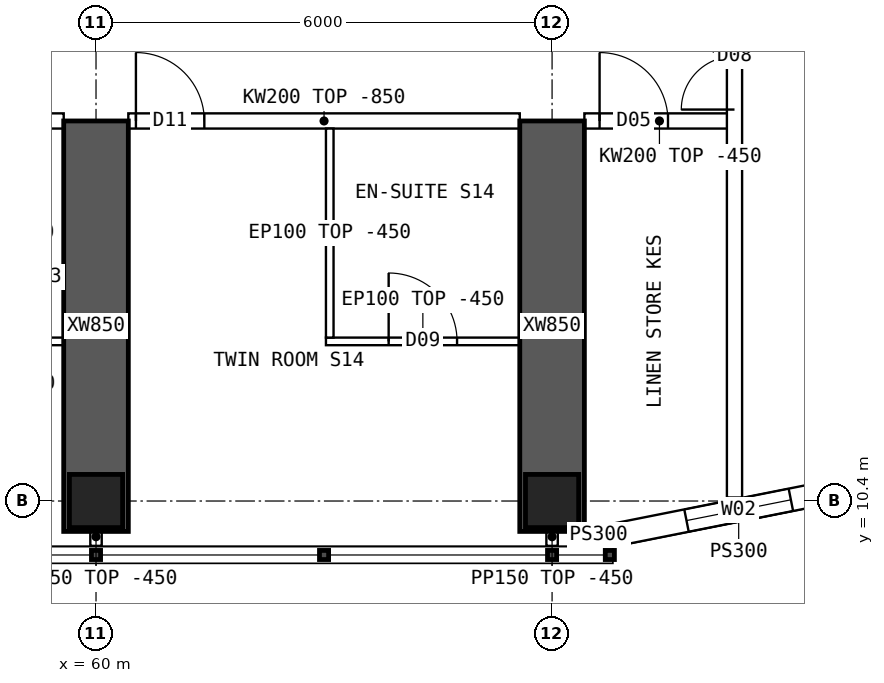
"""IFC4 building model, lengths in metres.
Left out: names, types, materials, properties, quantities, classifications, styles, units other than length and angle.
Written with IfcOpenShell. Run it as: python <this file> out.ifc"""

import sys

from ifc_helpers import new_model, si_unit, direction, frame, frame_2d, origin, origin_2d, place, context, subcontext, project, spatial, polyline, rectangle, hollow_rectangle, outline, extrude, element, fill, save


model = new_model("IFC4")
c1 = context("Model", 3, precision=1e-05, world=origin(), true_north=direction((0.0, 1.0)))
c2 = subcontext(c1, "Body", "Model", "MODEL_VIEW")
j1 = project(units=[si_unit("LENGTHUNIT", "METRE"), si_unit("PLANEANGLEUNIT", "RADIAN")], contexts=[c1])
p1 = place(None, origin())
s1 = spatial("IfcSite", under=j1, at=p1, CompositionType="ELEMENT")
p2 = place(p1, origin())
s2 = spatial("IfcBuilding", under=s1, at=p2, CompositionType="ELEMENT")
p3 = place(p2, frame((0.0, 0.0, 174.85)))
s3 = spatial("IfcBuildingStorey", under=s2, at=p3, CompositionType="ELEMENT", Elevation=174.85)
for number, where, z_axis, x_axis in (
    (1, (60.0, 10.4, 0.0), (0.0, 0.0, 1.0), (1.0, 0.0, 0.0)),
    (2, (66.0, 10.4, 0.0), (0.0, 0.0, 1.0), (1.0, 0.0, 0.0)),
):
    element("IfcColumn", number, at=place(p3, frame(where, z_axis=z_axis, x_axis=x_axis)), inside=s3, PredefinedType="COLUMN", context=c2, shape_type="SweptSolid", body=[
        extrude(hollow_rectangle(XDim=0.7, YDim=0.7, WallThickness=0.07, at=origin_2d()), origin(), (0.0, 0.0, 1.0), 3.75),
    ])
for number, where, z_axis, x_axis in (
    (3, (60.0, 10.0, 0.0), (0.0, 0.0, 1.0), (0.0, 1.0, 0.0)),
    (4, (66.0, 10.0, 0.0), (0.0, 0.0, 1.0), (0.0, 1.0, 0.0)),
):
    element("IfcWall", number, at=place(p3, frame(where, z_axis=z_axis, x_axis=x_axis)), inside=s3, PredefinedType="SHEAR", context=c2, shape_type="SweptSolid", body=[
        extrude(rectangle(XDim=5.4, YDim=0.85, at=frame_2d((2.7, 0.0))), origin(), (0.0, 0.0, 1.0), 3.75),
    ])
p4 = place(p3, frame((66.8, 9.95, 0.0), z_axis=(0.0, 0.0, 1.0), x_axis=(0.98078325777, 0.195100490205, 0.0)))
e5 = element("IfcWall", 5, at=p4, inside=s3, PredefinedType="SOLIDWALL", context=c2, shape_type="SweptSolid", body=[
    extrude(outline(polyline([(-0.03, -0.15), (3.405, -0.15), (3.345, 0.15), (0.03, 0.15), (-0.03, -0.15)])), origin(), (0.0, 0.0, 1.0), 3.3),
])
p5 = place(p4, frame((0.988, 0.0, 0.9)))
e6 = element("IfcOpeningElement", 6, at=p5, cuts=e5, PredefinedType="OPENING", context=c2, shape_type="SweptSolid", body=[
    extrude(rectangle(XDim=1.4, YDim=1.8, at=frame_2d((0.7, 0.9))), frame((0.0, 0.16, 0.0), z_axis=(0.0, -1.0, 0.0), x_axis=(1.0, 0.0, 0.0)), (0.0, 0.0, 1.0), 0.32),
])
p6 = place(p3, frame((66.8, 9.95, 0.0), z_axis=(0.0, 0.0, 1.0), x_axis=(-1.0, 0.0, 0.0)))
e7 = element("IfcWall", 7, at=p6, inside=s3, PredefinedType="SOLIDWALL", context=c2, shape_type="SweptSolid", body=[
    extrude(rectangle(XDim=0.375, YDim=0.3, at=frame_2d((0.188, 0.0))), origin(), (0.0, 0.0, 1.0), 3.3),
])
p7 = place(p3, frame((54.425, 15.4, 0.0), z_axis=(0.0, 0.0, 1.0), x_axis=(1.0, 0.0, 0.0)))
e8 = element("IfcWall", 8, at=p7, inside=s3, PredefinedType="SOLIDWALL", context=c2, shape_type="SweptSolid", body=[
    extrude(outline(polyline([(0.0, 0.0), (5.15, 0.0), (5.15, 2.9), (0.0, 2.9), (0.0, 0.0)])), frame((0.0, 0.1, 0.0), z_axis=(0.0, -1.0, 0.0), x_axis=(1.0, 0.0, 0.0)), (0.0, 0.0, 1.0), 0.2),
])
p8 = place(p7, frame((1.3, 0.0, 0.0)))
e9 = element("IfcOpeningElement", 9, at=p8, cuts=e8, PredefinedType="OPENING", context=c2, shape_type="SweptSolid", body=[
    extrude(rectangle(XDim=0.9, YDim=2.1, at=frame_2d((0.45, 1.05))), frame((0.0, 0.11, 0.0), z_axis=(0.0, -1.0, 0.0), x_axis=(1.0, 0.0, 0.0)), (0.0, 0.0, 1.0), 0.22),
])
p9 = place(p7, frame((2.75, 0.0, 0.0)))
e10 = element("IfcOpeningElement", 10, at=p9, cuts=e8, PredefinedType="OPENING", context=c2, shape_type="SweptSolid", body=[
    extrude(rectangle(XDim=0.9, YDim=2.1, at=frame_2d((0.45, 1.05))), frame((0.0, 0.11, 0.0), z_axis=(0.0, -1.0, 0.0), x_axis=(1.0, 0.0, 0.0)), (0.0, 0.0, 1.0), 0.22),
])
p10 = place(p3, frame((60.425, 15.4, 0.0), z_axis=(0.0, 0.0, 1.0), x_axis=(1.0, 0.0, 0.0)))
e11 = element("IfcWall", 11, at=p10, inside=s3, PredefinedType="SOLIDWALL", context=c2, shape_type="SweptSolid", body=[
    extrude(outline(polyline([(0.0, 0.0), (5.15, 0.0), (5.15, 2.9), (0.0, 2.9), (0.0, 0.0)])), frame((0.0, 0.1, 0.0), z_axis=(0.0, -1.0, 0.0), x_axis=(1.0, 0.0, 0.0)), (0.0, 0.0, 1.0), 0.2),
])
p11 = place(p10, frame((0.1, 0.0, 0.0)))
e12 = element("IfcOpeningElement", 12, at=p11, cuts=e11, PredefinedType="OPENING", context=c2, shape_type="SweptSolid", body=[
    extrude(rectangle(XDim=0.9, YDim=2.1, at=frame_2d((0.45, 1.05))), frame((0.0, 0.11, 0.0), z_axis=(0.0, -1.0, 0.0), x_axis=(1.0, 0.0, 0.0)), (0.0, 0.0, 1.0), 0.22),
])
p12 = place(p3, frame((66.425, 15.4, 0.0), z_axis=(0.0, 0.0, 1.0), x_axis=(1.0, 0.0, 0.0)))
e13 = element("IfcWall", 13, at=p12, inside=s3, PredefinedType="SOLIDWALL", context=c2, shape_type="SweptSolid", body=[
    extrude(rectangle(XDim=1.975, YDim=0.2, at=frame_2d((0.987, 0.0))), origin(), (0.0, 0.0, 1.0), 3.3),
])
p13 = place(p12, frame((0.2, 0.0, 0.0)))
e14 = element("IfcOpeningElement", 14, at=p13, cuts=e13, PredefinedType="OPENING", context=c2, shape_type="SweptSolid", body=[
    extrude(rectangle(XDim=0.9, YDim=2.1, at=frame_2d((0.45, 1.05))), frame((0.0, 0.11, 0.0), z_axis=(0.0, -1.0, 0.0), x_axis=(1.0, 0.0, 0.0)), (0.0, 0.0, 1.0), 0.22),
])
p14 = place(p3, frame((59.575, 12.5, 0.0), z_axis=(0.0, 0.0, 1.0), x_axis=(-1.0, 0.0, 0.0)))
e15 = element("IfcWall", 15, at=p14, inside=s3, PredefinedType="PARTITIONING", context=c2, shape_type="SweptSolid", body=[
    extrude(rectangle(XDim=1.25, YDim=0.1, at=frame_2d((0.625, 0.0))), origin(), (0.0, 0.0, 1.0), 3.3),
])
p15 = place(p14, frame((0.175, 0.0, 0.0)))
e16 = element("IfcOpeningElement", 16, at=p15, cuts=e15, PredefinedType="OPENING", context=c2, shape_type="SweptSolid", body=[
    extrude(rectangle(XDim=0.9, YDim=2.1, at=frame_2d((0.45, 1.05))), frame((0.0, 0.06, 0.0), z_axis=(0.0, -1.0, 0.0), x_axis=(1.0, 0.0, 0.0)), (0.0, 0.0, 1.0), 0.12),
])
p16 = place(p3, frame((65.575, 12.5, 0.0), z_axis=(0.0, 0.0, 1.0), x_axis=(-1.0, 0.0, 0.0)))
e17 = element("IfcWall", 17, at=p16, inside=s3, PredefinedType="PARTITIONING", context=c2, shape_type="SweptSolid", body=[
    extrude(rectangle(XDim=2.55, YDim=0.1, at=frame_2d((1.275, 0.0))), origin(), (0.0, 0.0, 1.0), 3.3),
])
p17 = place(p16, frame((0.825, 0.0, 0.0)))
e18 = element("IfcOpeningElement", 18, at=p17, cuts=e17, PredefinedType="OPENING", context=c2, shape_type="SweptSolid", body=[
    extrude(rectangle(XDim=0.9, YDim=2.1, at=frame_2d((0.45, 1.05))), frame((0.0, 0.06, 0.0), z_axis=(0.0, -1.0, 0.0), x_axis=(1.0, 0.0, 0.0)), (0.0, 0.0, 1.0), 0.12),
])
p18 = place(p3, frame((63.075, 12.55, 0.0), z_axis=(0.0, 0.0, 1.0), x_axis=(0.0, 1.0, 0.0)))
e19 = element("IfcWall", 19, at=p18, inside=s3, PredefinedType="PARTITIONING", context=c2, shape_type="SweptSolid", body=[
    extrude(outline(polyline([(0.0, 0.0), (2.75, 0.0), (2.75, 2.9), (2.702, 2.9), (2.7, 3.3), (0.0, 3.3), (0.0, 0.0)])), frame((0.0, 0.05, 0.0), z_axis=(0.0, -1.0, 0.0), x_axis=(1.0, 0.0, 0.0)), (0.0, 0.0, 1.0), 0.1),
])
p19 = place(p3, frame((68.4, 10.446, 0.0), z_axis=(0.0, 0.0, 1.0), x_axis=(0.0, 1.0, 0.0)))
e20 = element("IfcWall", 20, at=p19, inside=s3, PredefinedType="SOLIDWALL", context=c2, shape_type="SweptSolid", body=[
    extrude(rectangle(XDim=43.107, YDim=0.2, at=frame_2d((21.554, 0.0))), origin(), (0.0, 0.0, 1.0), 3.3),
])
p20 = place(p19, frame((13.914, 0.0, 0.0)))
e21 = element("IfcOpeningElement", 21, at=p20, cuts=e20, PredefinedType="OPENING", context=c2, shape_type="SweptSolid", body=[
    extrude(rectangle(XDim=1.2, YDim=2.1, at=frame_2d((0.6, 1.05))), frame((0.0, 0.11, 0.0), z_axis=(0.0, -1.0, 0.0), x_axis=(1.0, 0.0, 0.0)), (0.0, 0.0, 1.0), 0.22),
])
p21 = place(p19, frame((22.634, 0.0, 0.0)))
e22 = element("IfcOpeningElement", 22, at=p21, cuts=e20, PredefinedType="OPENING", context=c2, shape_type="SweptSolid", body=[
    extrude(rectangle(XDim=1.2, YDim=2.1, at=frame_2d((0.6, 1.05))), frame((0.0, 0.11, 0.0), z_axis=(0.0, -1.0, 0.0), x_axis=(1.0, 0.0, 0.0)), (0.0, 0.0, 1.0), 0.22),
])
p22 = place(p19, frame((5.104, 0.0, 0.0)))
e23 = element("IfcOpeningElement", 23, at=p22, cuts=e20, PredefinedType="OPENING", context=c2, shape_type="SweptSolid", body=[
    extrude(rectangle(XDim=1.4, YDim=2.1, at=frame_2d((0.7, 1.05))), frame((0.0, 0.11, 0.0), z_axis=(0.0, -1.0, 0.0), x_axis=(1.0, 0.0, 0.0)), (0.0, 0.0, 1.0), 0.22),
])
p23 = place(p19, frame((36.504, 0.0, 0.0)))
e24 = element("IfcOpeningElement", 24, at=p23, cuts=e20, PredefinedType="OPENING", context=c2, shape_type="SweptSolid", body=[
    extrude(rectangle(XDim=1.4, YDim=2.1, at=frame_2d((0.7, 1.05))), frame((0.0, 0.11, 0.0), z_axis=(0.0, -1.0, 0.0), x_axis=(1.0, 0.0, 0.0)), (0.0, 0.0, 1.0), 0.22),
])
for number, where, z_axis, x_axis in (
    (25, (60.0, 10.05, 0.0), (0.0, 0.0, 1.0), (0.0, -1.0, 0.0)),
    (26, (66.0, 10.05, 0.0), (0.0, 0.0, 1.0), (0.0, -1.0, 0.0)),
):
    element("IfcWall", number, at=place(p3, frame(where, z_axis=z_axis, x_axis=x_axis)), inside=s3, PredefinedType="PARTITIONING", context=c2, shape_type="SweptSolid", body=[
        extrude(rectangle(XDim=0.24, YDim=0.15, at=frame_2d((0.12, 0.0))), origin(), (0.0, 0.0, 1.0), 3.3),
    ])
p24 = place(p5, origin())
e27 = element("IfcWindow", 27, at=p24, inside=s3, PartitioningType="SINGLE_PANEL", PredefinedType="WINDOW", context=c2, shape_type="SweptSolid", body=[
    extrude(rectangle(XDim=1.4, YDim=1.8, at=frame_2d((0.7, 0.9))), frame((0.0, 0.03, 0.0), z_axis=(0.0, -1.0, 0.0), x_axis=(1.0, 0.0, 0.0)), (0.0, 0.0, 1.0), 0.06),
])
fill(e6, e27)
p25 = place(p17, origin())
e28 = element("IfcDoor", 28, at=p25, inside=s3, OperationType="SINGLE_SWING_RIGHT", PredefinedType="DOOR", context=c2, shape_type="SweptSolid", body=[
    extrude(rectangle(XDim=0.9, YDim=2.1, at=frame_2d((0.45, 1.05))), frame((0.0, 0.025, 0.0), z_axis=(0.0, -1.0, 0.0), x_axis=(1.0, 0.0, 0.0)), (0.0, 0.0, 1.0), 0.05),
])
fill(e18, e28)
p26 = place(p11, origin())
e29 = element("IfcDoor", 29, at=p26, inside=s3, OperationType="SINGLE_SWING_LEFT", PredefinedType="DOOR", context=c2, shape_type="SweptSolid", body=[
    extrude(rectangle(XDim=0.9, YDim=2.1, at=frame_2d((0.45, 1.05))), frame((0.0, 0.025, 0.0), z_axis=(0.0, -1.0, 0.0), x_axis=(1.0, 0.0, 0.0)), (0.0, 0.0, 1.0), 0.05),
])
fill(e12, e29)
p27 = place(p22, origin())
e30 = element("IfcDoor", 30, at=p27, inside=s3, OperationType="DOUBLE_DOOR_SINGLE_SWING", PredefinedType="DOOR", context=c2, shape_type="SweptSolid", body=[
    extrude(rectangle(XDim=1.4, YDim=2.1, at=frame_2d((0.7, 1.05))), frame((0.0, 0.025, 0.0), z_axis=(0.0, -1.0, 0.0), x_axis=(1.0, 0.0, 0.0)), (0.0, 0.0, 1.0), 0.05),
])
fill(e23, e30)
p28 = place(p13, origin())
e31 = element("IfcDoor", 31, at=p28, inside=s3, OperationType="SINGLE_SWING_LEFT", PredefinedType="DOOR", context=c2, shape_type="SweptSolid", body=[
    extrude(rectangle(XDim=0.9, YDim=2.1, at=frame_2d((0.45, 1.05))), frame((0.0, 0.025, 0.0), z_axis=(0.0, -1.0, 0.0), x_axis=(1.0, 0.0, 0.0)), (0.0, 0.0, 1.0), 0.05),
])
fill(e14, e31)
save(model, sys.argv[1])
